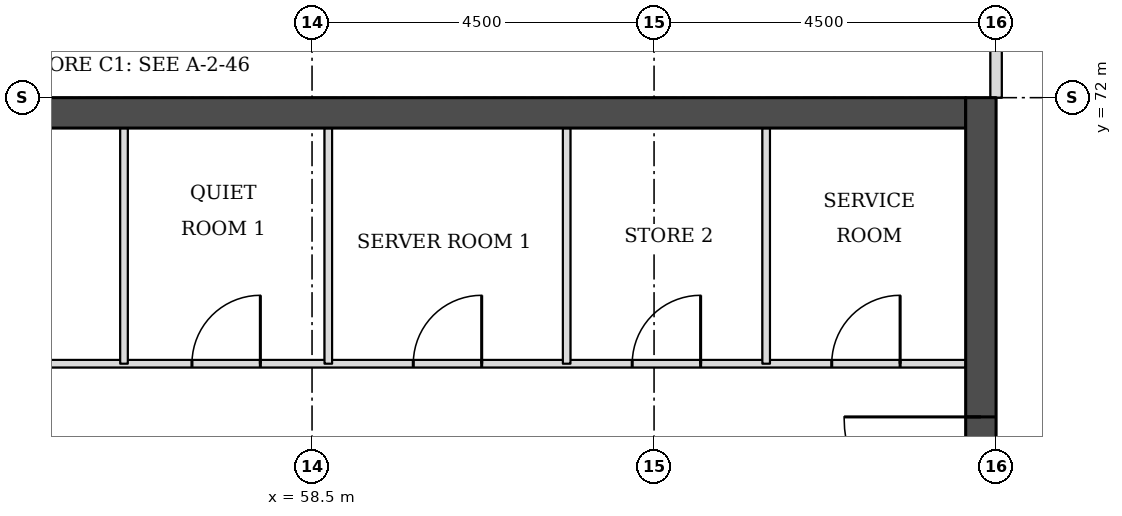
"""IFC4 building model, lengths in metres.
Left out: names, types, materials, properties, quantities, classifications, styles, units other than length and angle.
Written with IfcOpenShell. Run it as: python <this file> out.ifc"""

import sys

from ifc_helpers import new_model, si_unit, direction, frame, frame_2d, origin, place, context, subcontext, project, spatial, rectangle, extrude, element, fill, save


model = new_model("IFC4")
c1 = context("Model", 3, precision=1e-05, world=origin(), true_north=direction((0.0, 1.0)))
c2 = subcontext(c1, "Body", "Model", "MODEL_VIEW")
j1 = project(units=[si_unit("LENGTHUNIT", "METRE"), si_unit("PLANEANGLEUNIT", "RADIAN")], contexts=[c1])
p1 = place(None, origin())
s1 = spatial("IfcSite", under=j1, at=p1, CompositionType="ELEMENT")
p2 = place(p1, origin())
s2 = spatial("IfcBuilding", under=s1, at=p2, CompositionType="ELEMENT")
p3 = place(p2, frame((0.0, 0.0, 184.7)))
s3 = spatial("IfcBuildingStorey", under=s2, at=p3, CompositionType="ELEMENT", Elevation=184.7)
p4 = place(p3, frame((45.4, 71.8, 0.0), z_axis=(0.0, 0.0, 1.0), x_axis=(1.0, 0.0, 0.0)))
e1 = element("IfcWall", 1, at=p4, inside=s3, PredefinedType="SHEAR", context=c2, shape_type="SweptSolid", body=[
    extrude(rectangle(XDim=21.7, YDim=0.4, at=frame_2d((10.85, 0.0))), origin(), (0.0, 0.0, 1.0), 3.7),
])
p5 = place(p3, frame((67.3, 49.5, 0.0), z_axis=(0.0, 0.0, 1.0), x_axis=(0.0, 1.0, 0.0)))
e2 = element("IfcWall", 2, at=p5, inside=s3, PredefinedType="SHEAR", context=c2, shape_type="SweptSolid", body=[
    extrude(rectangle(XDim=22.5, YDim=0.4, at=frame_2d((11.25, 0.0))), origin(), (0.0, 0.0, 1.0), 3.7),
])
p6 = place(p5, frame((4.2, 0.0, 0.0)))
e3 = element("IfcOpeningElement", 3, at=p6, cuts=e2, PredefinedType="OPENING", context=c2, shape_type="SweptSolid", body=[
    extrude(rectangle(XDim=1.8, YDim=2.1, at=frame_2d((0.9, 1.05))), frame((0.0, 0.21, 0.0), z_axis=(0.0, -1.0, 0.0), x_axis=(1.0, 0.0, 0.0)), (0.0, 0.0, 1.0), 0.42),
])
p7 = place(p5, frame((6.9, 0.0, 0.0)))
e4 = element("IfcOpeningElement", 4, at=p7, cuts=e2, PredefinedType="OPENING", context=c2, shape_type="SweptSolid", body=[
    extrude(rectangle(XDim=1.1, YDim=2.1, at=frame_2d((0.55, 1.05))), frame((0.0, 0.21, 0.0), z_axis=(0.0, -1.0, 0.0), x_axis=(1.0, 0.0, 0.0)), (0.0, 0.0, 1.0), 0.42),
])
p8 = place(p5, frame((13.6, 0.0, 0.0)))
e5 = element("IfcOpeningElement", 5, at=p8, cuts=e2, PredefinedType="OPENING", context=c2, shape_type="SweptSolid", body=[
    extrude(rectangle(XDim=1.1, YDim=2.1, at=frame_2d((0.55, 1.05))), frame((0.0, 0.21, 0.0), z_axis=(0.0, -1.0, 0.0), x_axis=(1.0, 0.0, 0.0)), (0.0, 0.0, 1.0), 0.42),
])
p9 = place(p5, frame((16.5, 0.0, 0.0)))
e6 = element("IfcOpeningElement", 6, at=p9, cuts=e2, PredefinedType="OPENING", context=c2, shape_type="SweptSolid", body=[
    extrude(rectangle(XDim=1.8, YDim=2.1, at=frame_2d((0.9, 1.05))), frame((0.0, 0.21, 0.0), z_axis=(0.0, -1.0, 0.0), x_axis=(1.0, 0.0, 0.0)), (0.0, 0.0, 1.0), 0.42),
])
p10 = place(p3, frame((67.5, 72.0, 0.0), z_axis=(0.0, 0.0, 1.0), x_axis=(0.0, 1.0, 0.0)))
e7 = element("IfcWall", 7, at=p10, inside=s3, PredefinedType="PARTITIONING", context=c2, shape_type="SweptSolid", body=[
    extrude(rectangle(XDim=3.0, YDim=0.15, at=frame_2d((1.5, 0.0))), origin(), (0.0, 0.0, 1.0), 3.022),
])
p11 = place(p3, frame((45.4, 68.5, 0.0), z_axis=(0.0, 0.0, 1.0), x_axis=(1.0, 0.0, 0.0)))
e8 = element("IfcWall", 8, at=p11, inside=s3, PredefinedType="PARTITIONING", context=c2, shape_type="SweptSolid", body=[
    extrude(rectangle(XDim=21.7, YDim=0.1, at=frame_2d((10.85, 0.0))), origin(), (0.0, 0.0, 1.0), 3.55),
])
p12 = place(p11, frame((19.938, 0.0, 0.0)))
e9 = element("IfcOpeningElement", 9, at=p12, cuts=e8, PredefinedType="OPENING", context=c2, shape_type="SweptSolid", body=[
    extrude(rectangle(XDim=0.9, YDim=2.1, at=frame_2d((0.45, 1.05))), frame((0.0, 0.06, 0.0), z_axis=(0.0, -1.0, 0.0), x_axis=(1.0, 0.0, 0.0)), (0.0, 0.0, 1.0), 0.12),
])
p13 = place(p11, frame((17.312, 0.0, 0.0)))
e10 = element("IfcOpeningElement", 10, at=p13, cuts=e8, PredefinedType="OPENING", context=c2, shape_type="SweptSolid", body=[
    extrude(rectangle(XDim=0.9, YDim=2.1, at=frame_2d((0.45, 1.05))), frame((0.0, 0.06, 0.0), z_axis=(0.0, -1.0, 0.0), x_axis=(1.0, 0.0, 0.0)), (0.0, 0.0, 1.0), 0.12),
])
p14 = place(p11, frame((0.442, 0.0, 0.0)))
e11 = element("IfcOpeningElement", 11, at=p14, cuts=e8, PredefinedType="OPENING", context=c2, shape_type="SweptSolid", body=[
    extrude(rectangle(XDim=0.9, YDim=2.1, at=frame_2d((0.45, 1.05))), frame((0.0, 0.06, 0.0), z_axis=(0.0, -1.0, 0.0), x_axis=(1.0, 0.0, 0.0)), (0.0, 0.0, 1.0), 0.12),
])
p15 = place(p11, frame((2.201, 0.0, 0.0)))
e12 = element("IfcOpeningElement", 12, at=p15, cuts=e8, PredefinedType="OPENING", context=c2, shape_type="SweptSolid", body=[
    extrude(rectangle(XDim=0.9, YDim=2.1, at=frame_2d((0.45, 1.05))), frame((0.0, 0.06, 0.0), z_axis=(0.0, -1.0, 0.0), x_axis=(1.0, 0.0, 0.0)), (0.0, 0.0, 1.0), 0.12),
])
p16 = place(p11, frame((3.934, 0.0, 0.0)))
e13 = element("IfcOpeningElement", 13, at=p16, cuts=e8, PredefinedType="OPENING", context=c2, shape_type="SweptSolid", body=[
    extrude(rectangle(XDim=0.9, YDim=2.1, at=frame_2d((0.45, 1.05))), frame((0.0, 0.06, 0.0), z_axis=(0.0, -1.0, 0.0), x_axis=(1.0, 0.0, 0.0)), (0.0, 0.0, 1.0), 0.12),
])
p17 = place(p11, frame((14.432, 0.0, 0.0)))
e14 = element("IfcOpeningElement", 14, at=p17, cuts=e8, PredefinedType="OPENING", context=c2, shape_type="SweptSolid", body=[
    extrude(rectangle(XDim=0.9, YDim=2.1, at=frame_2d((0.45, 1.05))), frame((0.0, 0.06, 0.0), z_axis=(0.0, -1.0, 0.0), x_axis=(1.0, 0.0, 0.0)), (0.0, 0.0, 1.0), 0.12),
])
p18 = place(p11, frame((11.52, 0.0, 0.0)))
e15 = element("IfcOpeningElement", 15, at=p18, cuts=e8, PredefinedType="OPENING", context=c2, shape_type="SweptSolid", body=[
    extrude(rectangle(XDim=0.9, YDim=2.1, at=frame_2d((0.45, 1.05))), frame((0.0, 0.06, 0.0), z_axis=(0.0, -1.0, 0.0), x_axis=(1.0, 0.0, 0.0)), (0.0, 0.0, 1.0), 0.12),
])
p19 = place(p11, frame((7.488, 0.0, 0.0)))
e16 = element("IfcOpeningElement", 16, at=p19, cuts=e8, PredefinedType="OPENING", context=c2, shape_type="SweptSolid", body=[
    extrude(rectangle(XDim=0.9, YDim=2.1, at=frame_2d((0.45, 1.05))), frame((0.0, 0.06, 0.0), z_axis=(0.0, -1.0, 0.0), x_axis=(1.0, 0.0, 0.0)), (0.0, 0.0, 1.0), 0.12),
])
for number, where, z_axis, x_axis in (
    (17, (56.026, 68.5, 0.0), (0.0, 0.0, 1.0), (0.0, 1.0, 0.0)),
    (18, (58.714, 68.5, 0.0), (0.0, 0.0, 1.0), (0.0, 1.0, 0.0)),
    (19, (61.85, 68.5, 0.0), (0.0, 0.0, 1.0), (0.0, 1.0, 0.0)),
    (20, (64.475, 68.5, 0.0), (0.0, 0.0, 1.0), (0.0, 1.0, 0.0)),
):
    element("IfcWall", number, at=place(p3, frame(where, z_axis=z_axis, x_axis=x_axis)), inside=s3, PredefinedType="PARTITIONING", context=c2, shape_type="SweptSolid", body=[
        extrude(rectangle(XDim=3.1, YDim=0.1, at=frame_2d((1.55, 0.0))), origin(), (0.0, 0.0, 1.0), 3.55),
    ])
p20 = place(p9, origin())
e21 = element("IfcDoor", 21, at=p20, inside=s3, OperationType="SINGLE_SWING_RIGHT", PredefinedType="DOOR", context=c2, shape_type="SweptSolid", body=[
    extrude(rectangle(XDim=1.8, YDim=2.1, at=frame_2d((0.9, 1.05))), frame((0.0, 0.025, 0.0), z_axis=(0.0, -1.0, 0.0), x_axis=(1.0, 0.0, 0.0)), (0.0, 0.0, 1.0), 0.05),
])
fill(e6, e21)
p21 = place(p12, origin())
e22 = element("IfcDoor", 22, at=p21, inside=s3, OperationType="SINGLE_SWING_RIGHT", PredefinedType="DOOR", context=c2, shape_type="SweptSolid", body=[
    extrude(rectangle(XDim=0.9, YDim=2.1, at=frame_2d((0.45, 1.05))), frame((0.0, 0.025, 0.0), z_axis=(0.0, -1.0, 0.0), x_axis=(1.0, 0.0, 0.0)), (0.0, 0.0, 1.0), 0.05),
])
fill(e9, e22)
p22 = place(p13, origin())
e23 = element("IfcDoor", 23, at=p22, inside=s3, OperationType="SINGLE_SWING_RIGHT", PredefinedType="DOOR", context=c2, shape_type="SweptSolid", body=[
    extrude(rectangle(XDim=0.9, YDim=2.1, at=frame_2d((0.45, 1.05))), frame((0.0, 0.025, 0.0), z_axis=(0.0, -1.0, 0.0), x_axis=(1.0, 0.0, 0.0)), (0.0, 0.0, 1.0), 0.05),
])
fill(e10, e23)
p23 = place(p17, origin())
e24 = element("IfcDoor", 24, at=p23, inside=s3, OperationType="SINGLE_SWING_RIGHT", PredefinedType="DOOR", context=c2, shape_type="SweptSolid", body=[
    extrude(rectangle(XDim=0.9, YDim=2.1, at=frame_2d((0.45, 1.05))), frame((0.0, 0.025, 0.0), z_axis=(0.0, -1.0, 0.0), x_axis=(1.0, 0.0, 0.0)), (0.0, 0.0, 1.0), 0.05),
])
fill(e14, e24)
p24 = place(p18, origin())
e25 = element("IfcDoor", 25, at=p24, inside=s3, OperationType="SINGLE_SWING_RIGHT", PredefinedType="DOOR", context=c2, shape_type="SweptSolid", body=[
    extrude(rectangle(XDim=0.9, YDim=2.1, at=frame_2d((0.45, 1.05))), frame((0.0, 0.025, 0.0), z_axis=(0.0, -1.0, 0.0), x_axis=(1.0, 0.0, 0.0)), (0.0, 0.0, 1.0), 0.05),
])
fill(e15, e25)
save(model, sys.argv[1])
